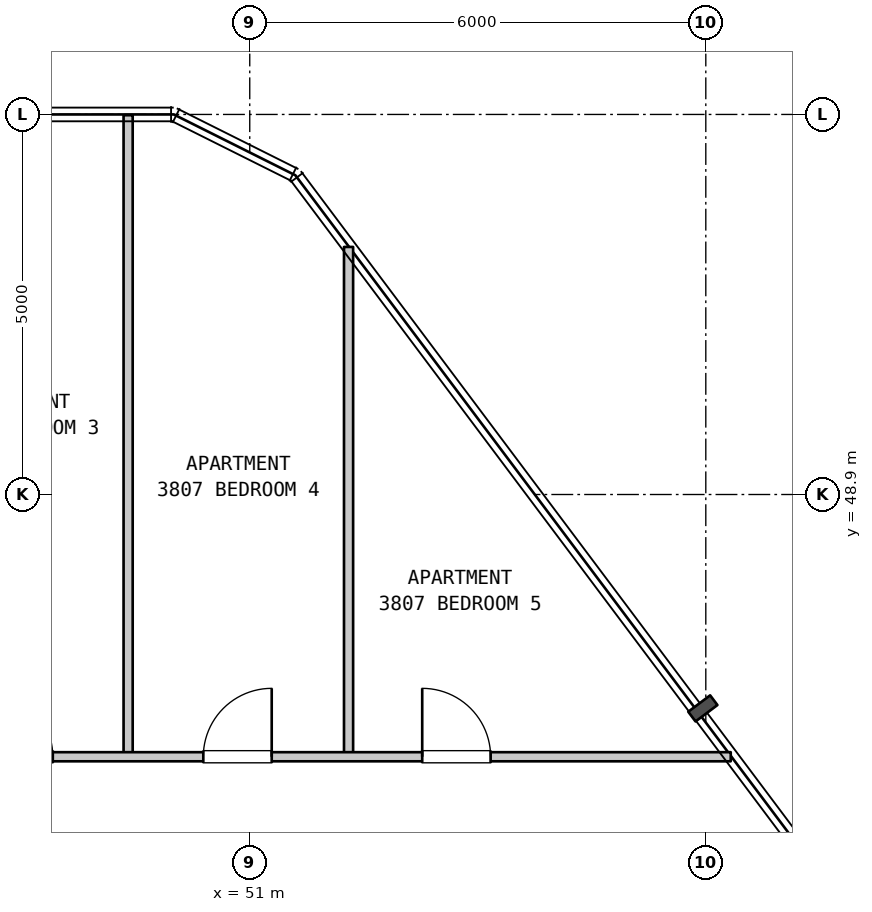
"""IFC4 building model, lengths in metres.
Left out: names, types, materials, properties, quantities, classifications, styles, units other than length and angle.
Written with IfcOpenShell. Run it as: python <this file> out.ifc"""

import sys

from ifc_helpers import new_model, si_unit, direction, frame, frame_2d, origin, place, context, subcontext, project, spatial, rectangle, extrude, element, fill, save


model = new_model("IFC4")
c1 = context("Model", 3, precision=1e-05, world=origin(), true_north=direction((0.0, 1.0)))
c2 = subcontext(c1, "Body", "Model", "MODEL_VIEW")
j1 = project(units=[si_unit("LENGTHUNIT", "METRE"), si_unit("PLANEANGLEUNIT", "RADIAN")], contexts=[c1])
p1 = place(None, origin())
s1 = spatial("IfcSite", under=j1, at=p1, CompositionType="ELEMENT")
p2 = place(p1, origin())
s2 = spatial("IfcBuilding", under=s1, at=p2, CompositionType="ELEMENT")
p3 = place(p2, frame((0.0, 0.0, 155.7)))
s3 = spatial("IfcBuildingStorey", under=s2, at=p3, CompositionType="ELEMENT", Elevation=155.7)
p4 = place(p3, frame((49.4, 45.45, 0.0), z_axis=(0.0, 0.0, 1.0), x_axis=(0.0, 1.0, 0.0)))
e1 = element("IfcWall", 1, at=p4, inside=s3, PredefinedType="PARTITIONING", context=c2, shape_type="SweptSolid", body=[
    extrude(rectangle(XDim=8.44, YDim=0.12, at=frame_2d((4.22, 0.0))), origin(), (0.0, 0.0, 1.0), 3.28),
])
p5 = place(p3, frame((52.3, 45.45, 0.0), z_axis=(0.0, 0.0, 1.0), x_axis=(0.0, 1.0, 0.0)))
e2 = element("IfcWall", 2, at=p5, inside=s3, PredefinedType="PARTITIONING", context=c2, shape_type="SweptSolid", body=[
    extrude(rectangle(XDim=6.707, YDim=0.12, at=frame_2d((3.354, 0.0))), origin(), (0.0, 0.0, 1.0), 3.28),
])
p6 = place(p3, frame((40.805, 45.45, 0.0), z_axis=(0.0, 0.0, 1.0), x_axis=(1.0, 0.0, 0.0)))
e3 = element("IfcWall", 3, at=p6, inside=s3, PredefinedType="PARTITIONING", context=c2, shape_type="SweptSolid", body=[
    extrude(rectangle(XDim=16.523, YDim=0.12, at=frame_2d((8.261, 0.0))), origin(), (0.0, 0.0, 1.0), 3.28),
])
p7 = place(p6, frame((1.12, 0.0, 0.0)))
e4 = element("IfcOpeningElement", 4, at=p7, cuts=e3, PredefinedType="OPENING", context=c2, shape_type="SweptSolid", body=[
    extrude(rectangle(XDim=0.9, YDim=2.15, at=frame_2d((0.45, 1.075))), frame((0.0, 0.07, 0.0), z_axis=(0.0, -1.0, 0.0), x_axis=(1.0, 0.0, 0.0)), (0.0, 0.0, 1.0), 0.14),
])
p8 = place(p6, frame((3.825, 0.0, 0.0)))
e5 = element("IfcOpeningElement", 5, at=p8, cuts=e3, PredefinedType="OPENING", context=c2, shape_type="SweptSolid", body=[
    extrude(rectangle(XDim=0.9, YDim=2.15, at=frame_2d((0.45, 1.075))), frame((0.0, 0.07, 0.0), z_axis=(0.0, -1.0, 0.0), x_axis=(1.0, 0.0, 0.0)), (0.0, 0.0, 1.0), 0.14),
])
p9 = place(p6, frame((6.704, 0.0, 0.0)))
e6 = element("IfcOpeningElement", 6, at=p9, cuts=e3, PredefinedType="OPENING", context=c2, shape_type="SweptSolid", body=[
    extrude(rectangle(XDim=0.9, YDim=2.15, at=frame_2d((0.45, 1.075))), frame((0.0, 0.07, 0.0), z_axis=(0.0, -1.0, 0.0), x_axis=(1.0, 0.0, 0.0)), (0.0, 0.0, 1.0), 0.14),
])
p10 = place(p6, frame((9.584, 0.0, 0.0)))
e7 = element("IfcOpeningElement", 7, at=p10, cuts=e3, PredefinedType="OPENING", context=c2, shape_type="SweptSolid", body=[
    extrude(rectangle(XDim=0.9, YDim=2.15, at=frame_2d((0.45, 1.075))), frame((0.0, 0.07, 0.0), z_axis=(0.0, -1.0, 0.0), x_axis=(1.0, 0.0, 0.0)), (0.0, 0.0, 1.0), 0.14),
])
p11 = place(p6, frame((12.464, 0.0, 0.0)))
e8 = element("IfcOpeningElement", 8, at=p11, cuts=e3, PredefinedType="OPENING", context=c2, shape_type="SweptSolid", body=[
    extrude(rectangle(XDim=0.9, YDim=2.15, at=frame_2d((0.45, 1.075))), frame((0.0, 0.07, 0.0), z_axis=(0.0, -1.0, 0.0), x_axis=(1.0, 0.0, 0.0)), (0.0, 0.0, 1.0), 0.14),
])
p12 = place(p9, origin())
e9 = element("IfcDoor", 9, at=p12, inside=s3, OperationType="SINGLE_SWING_LEFT", PredefinedType="DOOR", context=c2, shape_type="SweptSolid", body=[
    extrude(rectangle(XDim=0.9, YDim=2.15, at=frame_2d((0.45, 1.075))), frame((0.0, 0.025, 0.0), z_axis=(0.0, -1.0, 0.0), x_axis=(1.0, 0.0, 0.0)), (0.0, 0.0, 1.0), 0.05),
])
fill(e6, e9)
p13 = place(p10, origin())
e10 = element("IfcDoor", 10, at=p13, inside=s3, OperationType="SINGLE_SWING_RIGHT", PredefinedType="DOOR", context=c2, shape_type="SweptSolid", body=[
    extrude(rectangle(XDim=0.9, YDim=2.15, at=frame_2d((0.45, 1.075))), frame((0.0, 0.025, 0.0), z_axis=(0.0, -1.0, 0.0), x_axis=(1.0, 0.0, 0.0)), (0.0, 0.0, 1.0), 0.05),
])
fill(e7, e10)
p14 = place(p11, origin())
e11 = element("IfcDoor", 11, at=p14, inside=s3, OperationType="SINGLE_SWING_LEFT", PredefinedType="DOOR", context=c2, shape_type="SweptSolid", body=[
    extrude(rectangle(XDim=0.9, YDim=2.15, at=frame_2d((0.45, 1.075))), frame((0.0, 0.025, 0.0), z_axis=(0.0, -1.0, 0.0), x_axis=(1.0, 0.0, 0.0)), (0.0, 0.0, 1.0), 0.05),
])
fill(e8, e11)
save(model, sys.argv[1])
